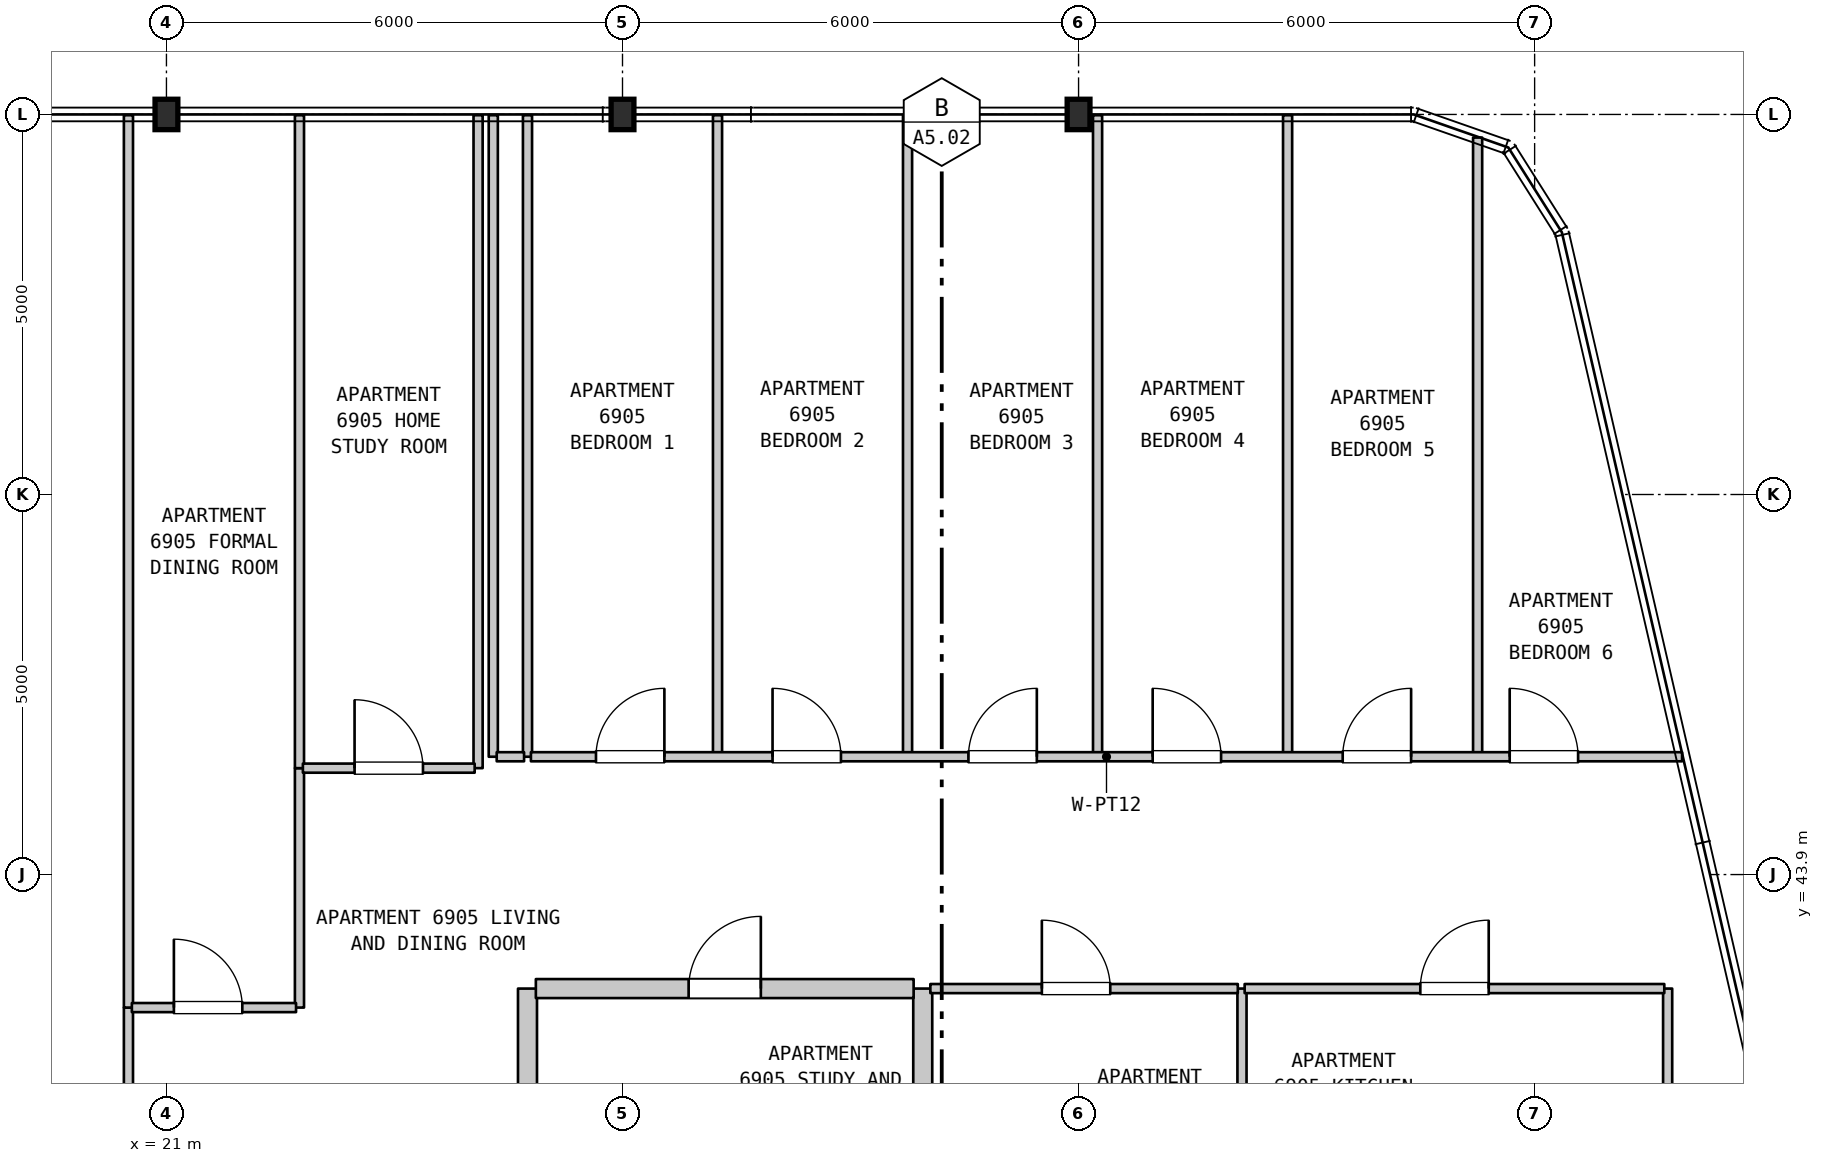
"""IFC4 building model, lengths in metres.
Left out: names, types, materials, properties, quantities, classifications, styles, units other than length and angle.
Written with IfcOpenShell. Run it as: python <this file> out.ifc"""

import sys

from ifc_helpers import new_model, si_unit, direction, frame, frame_2d, origin, origin_2d, place, context, subcontext, project, spatial, rectangle, i_section, extrude, element, fill, save


model = new_model("IFC4")
c1 = context("Model", 3, precision=1e-05, world=origin(), true_north=direction((0.0, 1.0)))
c2 = subcontext(c1, "Body", "Model", "MODEL_VIEW")
j1 = project(units=[si_unit("LENGTHUNIT", "METRE"), si_unit("PLANEANGLEUNIT", "RADIAN")], contexts=[c1])
p1 = place(None, origin())
s1 = spatial("IfcSite", under=j1, at=p1, CompositionType="ELEMENT")
p2 = place(p1, origin())
s2 = spatial("IfcBuilding", under=s1, at=p2, CompositionType="ELEMENT")
p3 = place(p2, frame((0.0, 0.0, 276.9)))
s3 = spatial("IfcBuildingStorey", under=s2, at=p3, CompositionType="ELEMENT", Elevation=276.9)
for number, where, z_axis, x_axis in (
    (1, (21.0, 53.9, 0.0), (0.0, 0.0, 1.0), (1.0, 0.0, 0.0)),
    (2, (27.0, 53.9, 0.0), (0.0, 0.0, 1.0), (1.0, 0.0, 0.0)),
    (3, (33.0, 53.9, 0.0), (0.0, 0.0, 1.0), (1.0, 0.0, 0.0)),
):
    element("IfcColumn", number, at=place(p3, frame(where, z_axis=z_axis, x_axis=x_axis)), inside=s3, PredefinedType="COLUMN", context=c2, shape_type="SweptSolid", body=[
        extrude(i_section(OverallWidth=0.3, OverallDepth=0.4, WebThickness=0.013, FlangeThickness=0.024, FilletRadius=0.027, at=origin_2d()), origin(), (0.0, 0.0, 1.0), 3.7),
    ])
p4 = place(p3, frame((20.5, 40.1, 0.0), z_axis=(0.0, 0.0, 1.0), x_axis=(0.0, 1.0, 0.0)))
e4 = element("IfcWall", 4, at=p4, inside=s3, PredefinedType="PARTITIONING", context=c2, shape_type="SweptSolid", body=[
    extrude(rectangle(XDim=2.05, YDim=0.12, at=frame_2d((1.025, 0.0))), origin(), (0.0, 0.0, 1.0), 3.39),
])
p5 = place(p3, frame((20.5, 42.15, 0.0), z_axis=(0.0, 0.0, 1.0), x_axis=(0.0, 1.0, 0.0)))
e5 = element("IfcWall", 5, at=p5, inside=s3, PredefinedType="PARTITIONING", context=c2, shape_type="SweptSolid", body=[
    extrude(rectangle(XDim=11.74, YDim=0.12, at=frame_2d((5.87, 0.0))), origin(), (0.0, 0.0, 1.0), 3.39),
])
p6 = place(p3, frame((22.75, 42.15, 0.0), z_axis=(0.0, 0.0, 1.0), x_axis=(0.0, 1.0, 0.0)))
e6 = element("IfcWall", 6, at=p6, inside=s3, PredefinedType="PARTITIONING", context=c2, shape_type="SweptSolid", body=[
    extrude(rectangle(XDim=3.15, YDim=0.12, at=frame_2d((1.575, 0.0))), origin(), (0.0, 0.0, 1.0), 3.39),
])
for number, where, z_axis, x_axis in (
    (7, (22.75, 45.3, 0.0), (0.0, 0.0, 1.0), (0.0, 1.0, 0.0)),
    (8, (25.1, 45.3, 0.0), (0.0, 0.0, 1.0), (0.0, 1.0, 0.0)),
):
    element("IfcWall", number, at=place(p3, frame(where, z_axis=z_axis, x_axis=x_axis)), inside=s3, PredefinedType="PARTITIONING", context=c2, shape_type="SweptSolid", body=[
        extrude(rectangle(XDim=8.59, YDim=0.12, at=frame_2d((4.295, 0.0))), origin(), (0.0, 0.0, 1.0), 3.39),
    ])
p7 = place(p3, frame((25.3, 45.45, 0.0), z_axis=(0.0, 0.0, 1.0), x_axis=(0.0, 1.0, 0.0)))
e9 = element("IfcWall", 9, at=p7, inside=s3, PredefinedType="PARTITIONING", context=c2, shape_type="SweptSolid", body=[
    extrude(rectangle(XDim=8.44, YDim=0.12, at=frame_2d((4.22, 0.0))), origin(), (0.0, 0.0, 1.0), 3.39),
])
p8 = place(p3, frame((25.75, 40.1, 0.0), z_axis=(0.0, 0.0, 1.0), x_axis=(0.0, 1.0, 0.0)))
e10 = element("IfcWall", 10, at=p8, inside=s3, PredefinedType="STANDARD", context=c2, shape_type="SweptSolid", body=[
    extrude(rectangle(XDim=2.3, YDim=0.25, at=frame_2d((1.15, 0.0))), origin(), (0.0, 0.0, 1.0), 3.39),
])
for number, where, z_axis, x_axis in (
    (11, (25.75, 45.45, 0.0), (0.0, 0.0, 1.0), (0.0, 1.0, 0.0)),
    (12, (28.25, 45.45, 0.0), (0.0, 0.0, 1.0), (0.0, 1.0, 0.0)),
    (13, (30.75, 45.45, 0.0), (0.0, 0.0, 1.0), (0.0, 1.0, 0.0)),
):
    element("IfcWall", number, at=place(p3, frame(where, z_axis=z_axis, x_axis=x_axis)), inside=s3, PredefinedType="PARTITIONING", context=c2, shape_type="SweptSolid", body=[
        extrude(rectangle(XDim=8.44, YDim=0.12, at=frame_2d((4.22, 0.0))), origin(), (0.0, 0.0, 1.0), 3.39),
    ])
p9 = place(p3, frame((30.95, 40.1, 0.0), z_axis=(0.0, 0.0, 1.0), x_axis=(0.0, 1.0, 0.0)))
e14 = element("IfcWall", 14, at=p9, inside=s3, PredefinedType="STANDARD", context=c2, shape_type="SweptSolid", body=[
    extrude(rectangle(XDim=2.3, YDim=0.25, at=frame_2d((1.15, 0.0))), origin(), (0.0, 0.0, 1.0), 3.39),
])
p10 = place(p3, frame((33.25, 45.45, 0.0), z_axis=(0.0, 0.0, 1.0), x_axis=(0.0, 1.0, 0.0)))
e15 = element("IfcWall", 15, at=p10, inside=s3, PredefinedType="PARTITIONING", context=c2, shape_type="SweptSolid", body=[
    extrude(rectangle(XDim=8.44, YDim=0.12, at=frame_2d((4.22, 0.0))), origin(), (0.0, 0.0, 1.0), 3.39),
])
p11 = place(p3, frame((35.15, 40.1, 0.0), z_axis=(0.0, 0.0, 1.0), x_axis=(0.0, 1.0, 0.0)))
e16 = element("IfcWall", 16, at=p11, inside=s3, PredefinedType="PARTITIONING", context=c2, shape_type="SweptSolid", body=[
    extrude(rectangle(XDim=2.3, YDim=0.12, at=frame_2d((1.15, 0.0))), origin(), (0.0, 0.0, 1.0), 3.39),
])
p12 = place(p3, frame((35.75, 45.45, 0.0), z_axis=(0.0, 0.0, 1.0), x_axis=(0.0, 1.0, 0.0)))
e17 = element("IfcWall", 17, at=p12, inside=s3, PredefinedType="PARTITIONING", context=c2, shape_type="SweptSolid", body=[
    extrude(rectangle(XDim=8.44, YDim=0.12, at=frame_2d((4.22, 0.0))), origin(), (0.0, 0.0, 1.0), 3.39),
])
p13 = place(p3, frame((38.25, 45.45, 0.0), z_axis=(0.0, 0.0, 1.0), x_axis=(0.0, 1.0, 0.0)))
e18 = element("IfcWall", 18, at=p13, inside=s3, PredefinedType="PARTITIONING", context=c2, shape_type="SweptSolid", body=[
    extrude(rectangle(XDim=8.146, YDim=0.12, at=frame_2d((4.073, 0.0))), origin(), (0.0, 0.0, 1.0), 3.39),
])
p14 = place(p3, frame((40.75, 40.1, 0.0), z_axis=(0.0, 0.0, 1.0), x_axis=(0.0, 1.0, 0.0)))
e19 = element("IfcWall", 19, at=p14, inside=s3, PredefinedType="PARTITIONING", context=c2, shape_type="SweptSolid", body=[
    extrude(rectangle(XDim=2.3, YDim=0.12, at=frame_2d((1.15, 0.0))), origin(), (0.0, 0.0, 1.0), 3.39),
])
p15 = place(p3, frame((20.545, 42.15, 0.0), z_axis=(0.0, 0.0, 1.0), x_axis=(1.0, 0.0, 0.0)))
e20 = element("IfcWall", 20, at=p15, inside=s3, PredefinedType="PARTITIONING", context=c2, shape_type="SweptSolid", body=[
    extrude(rectangle(XDim=2.16, YDim=0.12, at=frame_2d((1.08, 0.0))), origin(), (0.0, 0.0, 1.0), 3.39),
])
p16 = place(p15, frame((0.553, 0.0, 0.0)))
e21 = element("IfcOpeningElement", 21, at=p16, cuts=e20, PredefinedType="OPENING", context=c2, shape_type="SweptSolid", body=[
    extrude(rectangle(XDim=0.9, YDim=2.15, at=frame_2d((0.45, 1.075))), frame((0.0, 0.07, 0.0), z_axis=(0.0, -1.0, 0.0), x_axis=(1.0, 0.0, 0.0)), (0.0, 0.0, 1.0), 0.14),
])
p17 = place(p3, frame((25.86, 42.4, 0.0), z_axis=(0.0, 0.0, 1.0), x_axis=(1.0, 0.0, 0.0)))
e22 = element("IfcWall", 22, at=p17, inside=s3, PredefinedType="STANDARD", context=c2, shape_type="SweptSolid", body=[
    extrude(rectangle(XDim=4.97, YDim=0.25, at=frame_2d((2.485, 0.0))), origin(), (0.0, 0.0, 1.0), 3.39),
])
p18 = place(p17, frame((2.01, 0.0, 0.0)))
e23 = element("IfcOpeningElement", 23, at=p18, cuts=e22, PredefinedType="OPENING", context=c2, shape_type="SweptSolid", body=[
    extrude(rectangle(XDim=0.95, YDim=2.15, at=frame_2d((0.475, 1.075))), frame((0.0, 0.135, 0.0), z_axis=(0.0, -1.0, 0.0), x_axis=(1.0, 0.0, 0.0)), (0.0, 0.0, 1.0), 0.27),
])
p19 = place(p3, frame((31.05, 42.4, 0.0), z_axis=(0.0, 0.0, 1.0), x_axis=(1.0, 0.0, 0.0)))
e24 = element("IfcWall", 24, at=p19, inside=s3, PredefinedType="PARTITIONING", context=c2, shape_type="SweptSolid", body=[
    extrude(rectangle(XDim=4.045, YDim=0.12, at=frame_2d((2.022, 0.0))), origin(), (0.0, 0.0, 1.0), 3.39),
])
p20 = place(p19, frame((1.467, 0.0, 0.0)))
e25 = element("IfcOpeningElement", 25, at=p20, cuts=e24, PredefinedType="OPENING", context=c2, shape_type="SweptSolid", body=[
    extrude(rectangle(XDim=0.9, YDim=2.1, at=frame_2d((0.45, 1.05))), frame((0.0, 0.07, 0.0), z_axis=(0.0, -1.0, 0.0), x_axis=(1.0, 0.0, 0.0)), (0.0, 0.0, 1.0), 0.14),
])
p21 = place(p3, frame((35.185, 42.4, 0.0), z_axis=(0.0, 0.0, 1.0), x_axis=(1.0, 0.0, 0.0)))
e26 = element("IfcWall", 26, at=p21, inside=s3, PredefinedType="PARTITIONING", context=c2, shape_type="SweptSolid", body=[
    extrude(rectangle(XDim=5.521, YDim=0.12, at=frame_2d((2.76, 0.0))), origin(), (0.0, 0.0, 1.0), 3.39),
])
p22 = place(p21, frame((2.311, 0.0, 0.0)))
e27 = element("IfcOpeningElement", 27, at=p22, cuts=e26, PredefinedType="OPENING", context=c2, shape_type="SweptSolid", body=[
    extrude(rectangle(XDim=0.9, YDim=2.15, at=frame_2d((0.45, 1.075))), frame((0.0, 0.07, 0.0), z_axis=(0.0, -1.0, 0.0), x_axis=(1.0, 0.0, 0.0)), (0.0, 0.0, 1.0), 0.14),
])
p23 = place(p3, frame((22.795, 45.3, 0.0), z_axis=(0.0, 0.0, 1.0), x_axis=(1.0, 0.0, 0.0)))
e28 = element("IfcWall", 28, at=p23, inside=s3, PredefinedType="PARTITIONING", context=c2, shape_type="SweptSolid", body=[
    extrude(rectangle(XDim=2.26, YDim=0.12, at=frame_2d((1.13, 0.0))), origin(), (0.0, 0.0, 1.0), 3.39),
])
p24 = place(p23, frame((0.68, 0.0, 0.0)))
e29 = element("IfcOpeningElement", 29, at=p24, cuts=e28, PredefinedType="OPENING", context=c2, shape_type="SweptSolid", body=[
    extrude(rectangle(XDim=0.9, YDim=2.15, at=frame_2d((0.45, 1.075))), frame((0.0, 0.07, 0.0), z_axis=(0.0, -1.0, 0.0), x_axis=(1.0, 0.0, 0.0)), (0.0, 0.0, 1.0), 0.14),
])
p25 = place(p3, frame((25.345, 45.45, 0.0), z_axis=(0.0, 0.0, 1.0), x_axis=(1.0, 0.0, 0.0)))
e30 = element("IfcWall", 30, at=p25, inside=s3, PredefinedType="PARTITIONING", context=c2, shape_type="SweptSolid", body=[
    extrude(rectangle(XDim=0.36, YDim=0.12, at=frame_2d((0.18, 0.0))), origin(), (0.0, 0.0, 1.0), 3.39),
])
p26 = place(p3, frame((25.795, 45.45, 0.0), z_axis=(0.0, 0.0, 1.0), x_axis=(1.0, 0.0, 0.0)))
e31 = element("IfcWall", 31, at=p26, inside=s3, PredefinedType="PARTITIONING", context=c2, shape_type="SweptSolid", body=[
    extrude(rectangle(XDim=15.145, YDim=0.12, at=frame_2d((7.573, 0.0))), origin(), (0.0, 0.0, 1.0), 3.39),
])
p27 = place(p26, frame((0.856, 0.0, 0.0)))
e32 = element("IfcOpeningElement", 32, at=p27, cuts=e31, PredefinedType="OPENING", context=c2, shape_type="SweptSolid", body=[
    extrude(rectangle(XDim=0.9, YDim=2.15, at=frame_2d((0.45, 1.075))), frame((0.0, 0.07, 0.0), z_axis=(0.0, -1.0, 0.0), x_axis=(1.0, 0.0, 0.0)), (0.0, 0.0, 1.0), 0.14),
])
p28 = place(p26, frame((3.179, 0.0, 0.0)))
e33 = element("IfcOpeningElement", 33, at=p28, cuts=e31, PredefinedType="OPENING", context=c2, shape_type="SweptSolid", body=[
    extrude(rectangle(XDim=0.9, YDim=2.15, at=frame_2d((0.45, 1.075))), frame((0.0, 0.07, 0.0), z_axis=(0.0, -1.0, 0.0), x_axis=(1.0, 0.0, 0.0)), (0.0, 0.0, 1.0), 0.14),
])
p29 = place(p26, frame((5.756, 0.0, 0.0)))
e34 = element("IfcOpeningElement", 34, at=p29, cuts=e31, PredefinedType="OPENING", context=c2, shape_type="SweptSolid", body=[
    extrude(rectangle(XDim=0.9, YDim=2.15, at=frame_2d((0.45, 1.075))), frame((0.0, 0.07, 0.0), z_axis=(0.0, -1.0, 0.0), x_axis=(1.0, 0.0, 0.0)), (0.0, 0.0, 1.0), 0.14),
])
p30 = place(p26, frame((8.18, 0.0, 0.0)))
e35 = element("IfcOpeningElement", 35, at=p30, cuts=e31, PredefinedType="OPENING", context=c2, shape_type="SweptSolid", body=[
    extrude(rectangle(XDim=0.9, YDim=2.15, at=frame_2d((0.45, 1.075))), frame((0.0, 0.07, 0.0), z_axis=(0.0, -1.0, 0.0), x_axis=(1.0, 0.0, 0.0)), (0.0, 0.0, 1.0), 0.14),
])
p31 = place(p26, frame((10.68, 0.0, 0.0)))
e36 = element("IfcOpeningElement", 36, at=p31, cuts=e31, PredefinedType="OPENING", context=c2, shape_type="SweptSolid", body=[
    extrude(rectangle(XDim=0.9, YDim=2.15, at=frame_2d((0.45, 1.075))), frame((0.0, 0.07, 0.0), z_axis=(0.0, -1.0, 0.0), x_axis=(1.0, 0.0, 0.0)), (0.0, 0.0, 1.0), 0.14),
])
p32 = place(p26, frame((12.877, 0.0, 0.0)))
e37 = element("IfcOpeningElement", 37, at=p32, cuts=e31, PredefinedType="OPENING", context=c2, shape_type="SweptSolid", body=[
    extrude(rectangle(XDim=0.9, YDim=2.15, at=frame_2d((0.45, 1.075))), frame((0.0, 0.07, 0.0), z_axis=(0.0, -1.0, 0.0), x_axis=(1.0, 0.0, 0.0)), (0.0, 0.0, 1.0), 0.14),
])
p33 = place(p16, origin())
e38 = element("IfcDoor", 38, at=p33, inside=s3, OperationType="SINGLE_SWING_LEFT", PredefinedType="DOOR", context=c2, shape_type="SweptSolid", body=[
    extrude(rectangle(XDim=0.9, YDim=2.15, at=frame_2d((0.45, 1.075))), frame((0.0, 0.025, 0.0), z_axis=(0.0, -1.0, 0.0), x_axis=(1.0, 0.0, 0.0)), (0.0, 0.0, 1.0), 0.05),
])
fill(e21, e38)
p34 = place(p18, origin())
e39 = element("IfcDoor", 39, at=p34, inside=s3, OperationType="SINGLE_SWING_RIGHT", PredefinedType="DOOR", context=c2, shape_type="SweptSolid", body=[
    extrude(rectangle(XDim=0.95, YDim=2.15, at=frame_2d((0.475, 1.075))), frame((0.0, 0.025, 0.0), z_axis=(0.0, -1.0, 0.0), x_axis=(1.0, 0.0, 0.0)), (0.0, 0.0, 1.0), 0.05),
])
fill(e23, e39)
p35 = place(p20, origin())
e40 = element("IfcDoor", 40, at=p35, inside=s3, OperationType="SINGLE_SWING_LEFT", PredefinedType="DOOR", context=c2, shape_type="SweptSolid", body=[
    extrude(rectangle(XDim=0.9, YDim=2.1, at=frame_2d((0.45, 1.05))), frame((0.0, 0.025, 0.0), z_axis=(0.0, -1.0, 0.0), x_axis=(1.0, 0.0, 0.0)), (0.0, 0.0, 1.0), 0.05),
])
fill(e25, e40)
p36 = place(p22, origin())
e41 = element("IfcDoor", 41, at=p36, inside=s3, OperationType="SINGLE_SWING_RIGHT", PredefinedType="DOOR", context=c2, shape_type="SweptSolid", body=[
    extrude(rectangle(XDim=0.9, YDim=2.15, at=frame_2d((0.45, 1.075))), frame((0.0, 0.025, 0.0), z_axis=(0.0, -1.0, 0.0), x_axis=(1.0, 0.0, 0.0)), (0.0, 0.0, 1.0), 0.05),
])
fill(e27, e41)
p37 = place(p24, origin())
e42 = element("IfcDoor", 42, at=p37, inside=s3, OperationType="SINGLE_SWING_LEFT", PredefinedType="DOOR", context=c2, shape_type="SweptSolid", body=[
    extrude(rectangle(XDim=0.9, YDim=2.15, at=frame_2d((0.45, 1.075))), frame((0.0, 0.025, 0.0), z_axis=(0.0, -1.0, 0.0), x_axis=(1.0, 0.0, 0.0)), (0.0, 0.0, 1.0), 0.05),
])
fill(e29, e42)
p38 = place(p27, origin())
e43 = element("IfcDoor", 43, at=p38, inside=s3, OperationType="SINGLE_SWING_RIGHT", PredefinedType="DOOR", context=c2, shape_type="SweptSolid", body=[
    extrude(rectangle(XDim=0.9, YDim=2.15, at=frame_2d((0.45, 1.075))), frame((0.0, 0.025, 0.0), z_axis=(0.0, -1.0, 0.0), x_axis=(1.0, 0.0, 0.0)), (0.0, 0.0, 1.0), 0.05),
])
fill(e32, e43)
p39 = place(p28, origin())
e44 = element("IfcDoor", 44, at=p39, inside=s3, OperationType="SINGLE_SWING_LEFT", PredefinedType="DOOR", context=c2, shape_type="SweptSolid", body=[
    extrude(rectangle(XDim=0.9, YDim=2.15, at=frame_2d((0.45, 1.075))), frame((0.0, 0.025, 0.0), z_axis=(0.0, -1.0, 0.0), x_axis=(1.0, 0.0, 0.0)), (0.0, 0.0, 1.0), 0.05),
])
fill(e33, e44)
p40 = place(p29, origin())
e45 = element("IfcDoor", 45, at=p40, inside=s3, OperationType="SINGLE_SWING_RIGHT", PredefinedType="DOOR", context=c2, shape_type="SweptSolid", body=[
    extrude(rectangle(XDim=0.9, YDim=2.15, at=frame_2d((0.45, 1.075))), frame((0.0, 0.025, 0.0), z_axis=(0.0, -1.0, 0.0), x_axis=(1.0, 0.0, 0.0)), (0.0, 0.0, 1.0), 0.05),
])
fill(e34, e45)
p41 = place(p30, origin())
e46 = element("IfcDoor", 46, at=p41, inside=s3, OperationType="SINGLE_SWING_LEFT", PredefinedType="DOOR", context=c2, shape_type="SweptSolid", body=[
    extrude(rectangle(XDim=0.9, YDim=2.15, at=frame_2d((0.45, 1.075))), frame((0.0, 0.025, 0.0), z_axis=(0.0, -1.0, 0.0), x_axis=(1.0, 0.0, 0.0)), (0.0, 0.0, 1.0), 0.05),
])
fill(e35, e46)
p42 = place(p31, origin())
e47 = element("IfcDoor", 47, at=p42, inside=s3, OperationType="SINGLE_SWING_RIGHT", PredefinedType="DOOR", context=c2, shape_type="SweptSolid", body=[
    extrude(rectangle(XDim=0.9, YDim=2.15, at=frame_2d((0.45, 1.075))), frame((0.0, 0.025, 0.0), z_axis=(0.0, -1.0, 0.0), x_axis=(1.0, 0.0, 0.0)), (0.0, 0.0, 1.0), 0.05),
])
fill(e36, e47)
p43 = place(p32, origin())
e48 = element("IfcDoor", 48, at=p43, inside=s3, OperationType="SINGLE_SWING_LEFT", PredefinedType="DOOR", context=c2, shape_type="SweptSolid", body=[
    extrude(rectangle(XDim=0.9, YDim=2.15, at=frame_2d((0.45, 1.075))), frame((0.0, 0.025, 0.0), z_axis=(0.0, -1.0, 0.0), x_axis=(1.0, 0.0, 0.0)), (0.0, 0.0, 1.0), 0.05),
])
fill(e37, e48)
save(model, sys.argv[1])
